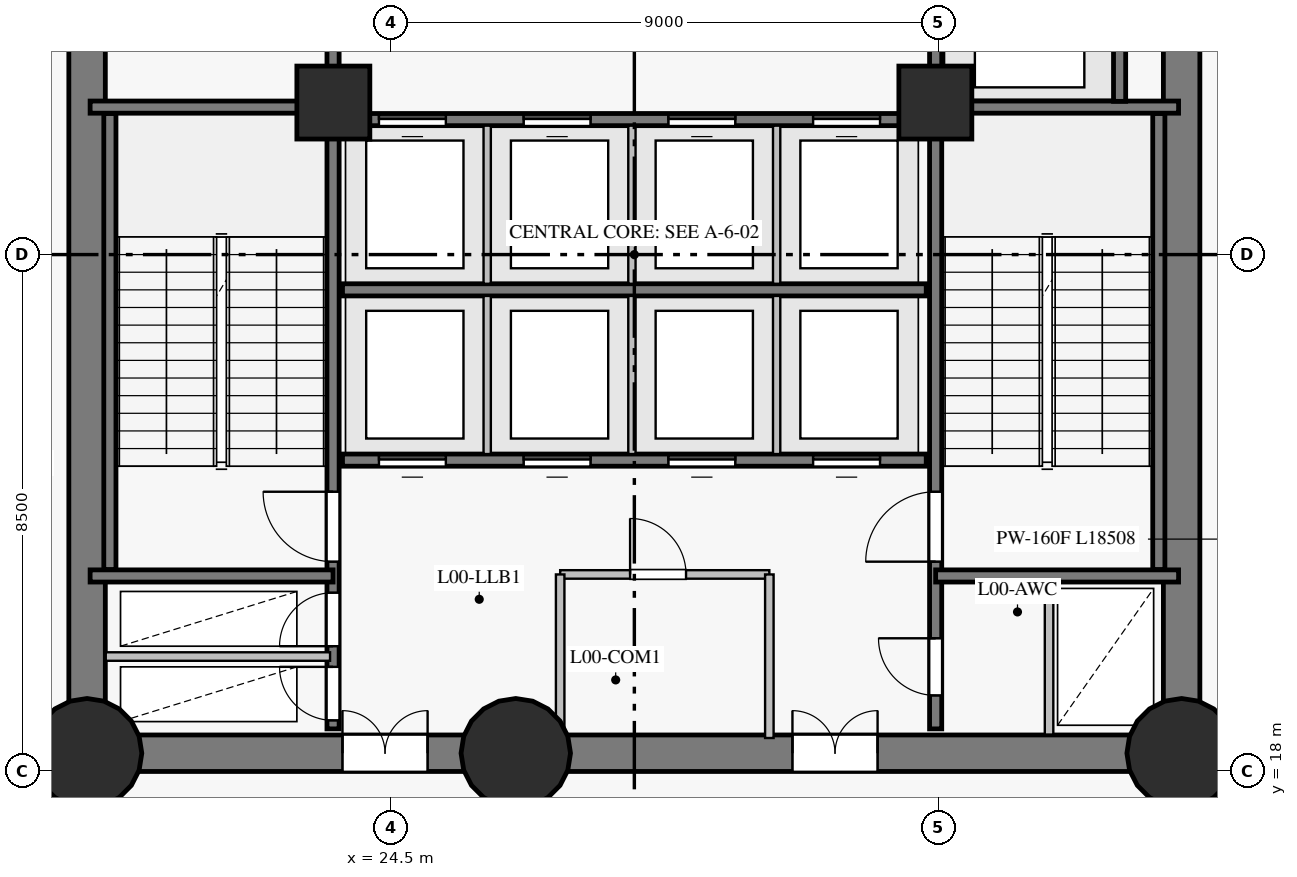
"""IFC4 building model, lengths in metres.
Left out: names, types, materials, properties, quantities, classifications, styles, units other than length and angle.
Written with IfcOpenShell. Run it as: python <this file> out.ifc"""

import sys

from ifc_helpers import new_model, si_unit, direction, frame, frame_2d, origin, origin_with_axes, origin_2d, place, context, subcontext, project, spatial, rectangle, circle, extrude, source, transform, mapped, element, fill, save


model = new_model("IFC4")
c1 = context("Model", 3, precision=1e-05, world=origin(), true_north=direction((0.0, 1.0)))
c2 = subcontext(c1, "Body", "Model", "MODEL_VIEW")
j1 = project(units=[si_unit("LENGTHUNIT", "METRE"), si_unit("PLANEANGLEUNIT", "RADIAN")], contexts=[c1])
p1 = place(None, origin())
s1 = spatial("IfcSite", under=j1, at=p1, CompositionType="ELEMENT")
p2 = place(p1, origin())
s2 = spatial("IfcBuilding", under=s1, at=p2, CompositionType="ELEMENT")
p3 = place(p2, origin())
s3 = spatial("IfcBuildingStorey", under=s2, at=p3, CompositionType="ELEMENT", Elevation=0.0)
p4 = place(p3, frame((19.5, 18.3, 0.0), z_axis=(0.0, 0.0, 1.0), x_axis=(1.0, 0.0, 0.0)))
e1 = element("IfcWall", 1, at=p4, inside=s3, PredefinedType="SHEAR", context=c2, shape_type="SweptSolid", body=[
    extrude(rectangle(XDim=7.05, YDim=0.6, at=frame_2d((3.525, 0.0))), origin(), (0.0, 0.0, 1.0), 4.2),
])
p5 = place(p4, frame((4.2, 0.0, 0.0)))
e2 = element("IfcOpeningElement", 2, at=p5, cuts=e1, PredefinedType="OPENING", context=c2, shape_type="SweptSolid", body=[
    extrude(rectangle(XDim=1.4, YDim=2.2, at=frame_2d((0.7, 1.1))), frame((0.0, 0.31, 0.0), z_axis=(0.0, -1.0, 0.0), x_axis=(1.0, 0.0, 0.0)), (0.0, 0.0, 1.0), 0.62),
])
p6 = place(p3, frame((26.55, 18.3, 0.0), z_axis=(0.0, 0.0, 1.0), x_axis=(1.0, 0.0, 0.0)))
e3 = element("IfcWall", 3, at=p6, inside=s3, PredefinedType="SHEAR", context=c2, shape_type="SweptSolid", body=[
    extrude(rectangle(XDim=10.95, YDim=0.6, at=frame_2d((5.475, 0.0))), origin(), (0.0, 0.0, 1.0), 4.2),
])
p7 = place(p6, frame((4.55, 0.0, 0.0)))
e4 = element("IfcOpeningElement", 4, at=p7, cuts=e3, PredefinedType="OPENING", context=c2, shape_type="SweptSolid", body=[
    extrude(rectangle(XDim=1.4, YDim=2.2, at=frame_2d((0.7, 1.1))), frame((0.0, 0.31, 0.0), z_axis=(0.0, -1.0, 0.0), x_axis=(1.0, 0.0, 0.0)), (0.0, 0.0, 1.0), 0.62),
])
p8 = place(p3, frame((37.5, 18.3, 0.0), z_axis=(0.0, 0.0, 1.0), x_axis=(0.0, 1.0, 0.0)))
e5 = element("IfcWall", 5, at=p8, inside=s3, PredefinedType="SHEAR", context=c2, shape_type="SweptSolid", body=[
    extrude(rectangle(XDim=16.4, YDim=0.6, at=frame_2d((8.2, 0.0))), origin(), (0.0, 0.0, 1.0), 4.2),
])
p9 = place(p8, frame((13.96, 0.0, 0.0)))
e6 = element("IfcOpeningElement", 6, at=p9, cuts=e5, PredefinedType="OPENING", context=c2, shape_type="SweptSolid", body=[
    extrude(rectangle(XDim=1.2, YDim=2.15, at=frame_2d((0.6, 1.075))), frame((0.0, 0.31, 0.0), z_axis=(0.0, -1.0, 0.0), x_axis=(1.0, 0.0, 0.0)), (0.0, 0.0, 1.0), 0.62),
])
p10 = place(p3, frame((19.5, 34.7, 0.0), z_axis=(0.0, 0.0, 1.0), x_axis=(0.0, -1.0, 0.0)))
e7 = element("IfcWall", 7, at=p10, inside=s3, PredefinedType="SHEAR", context=c2, shape_type="SweptSolid", body=[
    extrude(rectangle(XDim=16.4, YDim=0.6, at=frame_2d((8.2, 0.0))), origin(), (0.0, 0.0, 1.0), 4.2),
])
p11 = place(p10, frame((3.1, 0.0, 0.0)))
e8 = element("IfcOpeningElement", 8, at=p11, cuts=e7, PredefinedType="OPENING", context=c2, shape_type="SweptSolid", body=[
    extrude(rectangle(XDim=1.1, YDim=2.15, at=frame_2d((0.55, 1.075))), frame((0.0, 0.31, 0.0), z_axis=(0.0, -1.0, 0.0), x_axis=(1.0, 0.0, 0.0)), (0.0, 0.0, 1.0), 0.62),
])
m1 = source(origin_with_axes(), c2, "Body", "SweptSolid", [
    extrude(circle(Radius=0.9, at=origin_2d()), origin(), (0.0, 0.0, 1.0), 4.5),
])
for number, where, z_axis, x_axis in (
    (9, (19.5, 18.3, 0.0), (0.0, 0.0, 1.0), (1.0, 0.0, 0.0)),
    (10, (26.55, 18.3, 0.0), (0.0, 0.0, 1.0), (1.0, 0.0, 0.0)),
    (11, (37.5, 18.3, 0.0), (0.0, 0.0, 1.0), (1.0, 0.0, 0.0)),
):
    element("IfcColumn", number, at=place(p3, frame(where, z_axis=z_axis, x_axis=x_axis)), inside=s3, PredefinedType="COLUMN", context=c2, shape_type="MappedRepresentation", body=[
        mapped(m1, transform((0.0, 0.0, 0.0), scale=1.0)),
    ])
m2 = source(origin_with_axes(), c2, "Body", "SweptSolid", [
    extrude(rectangle(XDim=1.2, YDim=1.2, at=origin_2d()), origin(), (0.0, 0.0, 1.0), 4.5),
])
for number, where, z_axis, x_axis in (
    (12, (23.55, 29.0, 0.0), (0.0, 0.0, 1.0), (1.0, 0.0, 0.0)),
    (13, (33.45, 29.0, 0.0), (0.0, 0.0, 1.0), (1.0, 0.0, 0.0)),
):
    element("IfcColumn", number, at=place(p3, frame(where, z_axis=z_axis, x_axis=x_axis)), inside=s3, PredefinedType="COLUMN", context=c2, shape_type="MappedRepresentation", body=[
        mapped(m2, transform((0.0, 0.0, 0.0), scale=1.0)),
    ])
p12 = place(p3, frame((23.545, 18.7, 0.0), z_axis=(0.0, 0.0, 1.0), x_axis=(0.0, 1.0, 0.0)))
e14 = element("IfcWall", 14, at=p12, inside=s3, PredefinedType="SHEAR", context=c2, shape_type="SweptSolid", body=[
    extrude(rectangle(XDim=15.6, YDim=0.2, at=frame_2d((7.8, 0.0))), origin(), (0.0, 0.0, 1.0), 4.2),
])
p13 = place(p12, frame((2.75, 0.0, 0.0)))
e15 = element("IfcOpeningElement", 15, at=p13, cuts=e14, PredefinedType="OPENING", context=c2, shape_type="SweptSolid", body=[
    extrude(rectangle(XDim=1.15, YDim=2.15, at=frame_2d((0.575, 1.075))), frame((0.0, 0.11, 0.0), z_axis=(0.0, -1.0, 0.0), x_axis=(1.0, 0.0, 0.0)), (0.0, 0.0, 1.0), 0.22),
])
p14 = place(p12, frame((0.14, 0.0, 0.0)))
e16 = element("IfcOpeningElement", 16, at=p14, cuts=e14, PredefinedType="OPENING", context=c2, shape_type="SweptSolid", body=[
    extrude(rectangle(XDim=0.88, YDim=2.1, at=frame_2d((0.44, 1.05))), frame((0.0, 0.11, 0.0), z_axis=(0.0, -1.0, 0.0), x_axis=(1.0, 0.0, 0.0)), (0.0, 0.0, 1.0), 0.22),
])
p15 = place(p12, frame((1.36, 0.0, 0.0)))
e17 = element("IfcOpeningElement", 17, at=p15, cuts=e14, PredefinedType="OPENING", context=c2, shape_type="SweptSolid", body=[
    extrude(rectangle(XDim=0.88, YDim=2.1, at=frame_2d((0.44, 1.05))), frame((0.0, 0.11, 0.0), z_axis=(0.0, -1.0, 0.0), x_axis=(1.0, 0.0, 0.0)), (0.0, 0.0, 1.0), 0.22),
])
p16 = place(p12, frame((12.1, 0.0, 0.0)))
e18 = element("IfcOpeningElement", 18, at=p16, cuts=e14, PredefinedType="OPENING", context=c2, shape_type="SweptSolid", body=[
    extrude(rectangle(XDim=1.12, YDim=2.15, at=frame_2d((0.56, 1.075))), frame((0.0, 0.11, 0.0), z_axis=(0.0, -1.0, 0.0), x_axis=(1.0, 0.0, 0.0)), (0.0, 0.0, 1.0), 0.22),
])
p17 = place(p12, frame((14.05, 0.0, 0.0)))
e19 = element("IfcOpeningElement", 19, at=p17, cuts=e14, PredefinedType="OPENING", context=c2, shape_type="SweptSolid", body=[
    extrude(rectangle(XDim=1.12, YDim=2.15, at=frame_2d((0.56, 1.075))), frame((0.0, 0.11, 0.0), z_axis=(0.0, -1.0, 0.0), x_axis=(1.0, 0.0, 0.0)), (0.0, 0.0, 1.0), 0.22),
])
p18 = place(p3, frame((33.455, 18.7, 0.0), z_axis=(0.0, 0.0, 1.0), x_axis=(0.0, 1.0, 0.0)))
e20 = element("IfcWall", 20, at=p18, inside=s3, PredefinedType="SHEAR", context=c2, shape_type="SweptSolid", body=[
    extrude(rectangle(XDim=15.6, YDim=0.2, at=frame_2d((7.8, 0.0))), origin(), (0.0, 0.0, 1.0), 4.2),
])
p19 = place(p18, frame((2.75, 0.0, 0.0)))
e21 = element("IfcOpeningElement", 21, at=p19, cuts=e20, PredefinedType="OPENING", context=c2, shape_type="SweptSolid", body=[
    extrude(rectangle(XDim=1.15, YDim=2.15, at=frame_2d((0.575, 1.075))), frame((0.0, 0.11, 0.0), z_axis=(0.0, -1.0, 0.0), x_axis=(1.0, 0.0, 0.0)), (0.0, 0.0, 1.0), 0.22),
])
p20 = place(p18, frame((0.55, 0.0, 0.0)))
e22 = element("IfcOpeningElement", 22, at=p20, cuts=e20, PredefinedType="OPENING", context=c2, shape_type="SweptSolid", body=[
    extrude(rectangle(XDim=0.94, YDim=2.1, at=frame_2d((0.47, 1.05))), frame((0.0, 0.11, 0.0), z_axis=(0.0, -1.0, 0.0), x_axis=(1.0, 0.0, 0.0)), (0.0, 0.0, 1.0), 0.22),
])
p21 = place(p3, frame((23.7, 23.12, 0.0), z_axis=(0.0, 0.0, 1.0), x_axis=(1.0, 0.0, 0.0)))
e23 = element("IfcWall", 23, at=p21, inside=s3, PredefinedType="SHEAR", context=c2, shape_type="SweptSolid", body=[
    extrude(rectangle(XDim=9.6, YDim=0.2, at=frame_2d((4.8, 0.0))), origin(), (0.0, 0.0, 1.0), 4.2),
])
p22 = place(p21, frame((0.6, 0.0, 0.0)))
e24 = element("IfcOpeningElement", 24, at=p22, cuts=e23, PredefinedType="OPENING", context=c2, shape_type="SweptSolid", body=[
    extrude(rectangle(XDim=1.1, YDim=2.15, at=frame_2d((0.55, 1.075))), frame((0.0, 0.11, 0.0), z_axis=(0.0, -1.0, 0.0), x_axis=(1.0, 0.0, 0.0)), (0.0, 0.0, 1.0), 0.22),
])
p23 = place(p21, frame((2.98, 0.0, 0.0)))
e25 = element("IfcOpeningElement", 25, at=p23, cuts=e23, PredefinedType="OPENING", context=c2, shape_type="SweptSolid", body=[
    extrude(rectangle(XDim=1.1, YDim=2.15, at=frame_2d((0.55, 1.075))), frame((0.0, 0.11, 0.0), z_axis=(0.0, -1.0, 0.0), x_axis=(1.0, 0.0, 0.0)), (0.0, 0.0, 1.0), 0.22),
])
p24 = place(p21, frame((5.36, 0.0, 0.0)))
e26 = element("IfcOpeningElement", 26, at=p24, cuts=e23, PredefinedType="OPENING", context=c2, shape_type="SweptSolid", body=[
    extrude(rectangle(XDim=1.1, YDim=2.15, at=frame_2d((0.55, 1.075))), frame((0.0, 0.11, 0.0), z_axis=(0.0, -1.0, 0.0), x_axis=(1.0, 0.0, 0.0)), (0.0, 0.0, 1.0), 0.22),
])
p25 = place(p21, frame((7.74, 0.0, 0.0)))
e27 = element("IfcOpeningElement", 27, at=p25, cuts=e23, PredefinedType="OPENING", context=c2, shape_type="SweptSolid", body=[
    extrude(rectangle(XDim=1.1, YDim=2.15, at=frame_2d((0.55, 1.075))), frame((0.0, 0.11, 0.0), z_axis=(0.0, -1.0, 0.0), x_axis=(1.0, 0.0, 0.0)), (0.0, 0.0, 1.0), 0.22),
])
p26 = place(p3, frame((23.7, 25.92, 0.0), z_axis=(0.0, 0.0, 1.0), x_axis=(1.0, 0.0, 0.0)))
e28 = element("IfcWall", 28, at=p26, inside=s3, PredefinedType="SHEAR", context=c2, shape_type="SweptSolid", body=[
    extrude(rectangle(XDim=9.6, YDim=0.2, at=frame_2d((4.8, 0.0))), origin(), (0.0, 0.0, 1.0), 4.2),
])
p27 = place(p3, frame((23.7, 28.72, 0.0), z_axis=(0.0, 0.0, 1.0), x_axis=(1.0, 0.0, 0.0)))
e29 = element("IfcWall", 29, at=p27, inside=s3, PredefinedType="SHEAR", context=c2, shape_type="SweptSolid", body=[
    extrude(rectangle(XDim=9.6, YDim=0.2, at=frame_2d((4.8, 0.0))), origin(), (0.0, 0.0, 1.0), 4.2),
])
p28 = place(p27, frame((0.6, 0.0, 0.0)))
e30 = element("IfcOpeningElement", 30, at=p28, cuts=e29, PredefinedType="OPENING", context=c2, shape_type="SweptSolid", body=[
    extrude(rectangle(XDim=1.1, YDim=2.15, at=frame_2d((0.55, 1.075))), frame((0.0, 0.11, 0.0), z_axis=(0.0, -1.0, 0.0), x_axis=(1.0, 0.0, 0.0)), (0.0, 0.0, 1.0), 0.22),
])
p29 = place(p27, frame((2.98, 0.0, 0.0)))
e31 = element("IfcOpeningElement", 31, at=p29, cuts=e29, PredefinedType="OPENING", context=c2, shape_type="SweptSolid", body=[
    extrude(rectangle(XDim=1.1, YDim=2.15, at=frame_2d((0.55, 1.075))), frame((0.0, 0.11, 0.0), z_axis=(0.0, -1.0, 0.0), x_axis=(1.0, 0.0, 0.0)), (0.0, 0.0, 1.0), 0.22),
])
p30 = place(p27, frame((5.36, 0.0, 0.0)))
e32 = element("IfcOpeningElement", 32, at=p30, cuts=e29, PredefinedType="OPENING", context=c2, shape_type="SweptSolid", body=[
    extrude(rectangle(XDim=1.1, YDim=2.15, at=frame_2d((0.55, 1.075))), frame((0.0, 0.11, 0.0), z_axis=(0.0, -1.0, 0.0), x_axis=(1.0, 0.0, 0.0)), (0.0, 0.0, 1.0), 0.22),
])
p31 = place(p27, frame((7.74, 0.0, 0.0)))
e33 = element("IfcOpeningElement", 33, at=p31, cuts=e29, PredefinedType="OPENING", context=c2, shape_type="SweptSolid", body=[
    extrude(rectangle(XDim=1.1, YDim=2.15, at=frame_2d((0.55, 1.075))), frame((0.0, 0.11, 0.0), z_axis=(0.0, -1.0, 0.0), x_axis=(1.0, 0.0, 0.0)), (0.0, 0.0, 1.0), 0.22),
])
for number, where, z_axis, x_axis in (
    (34, (19.875, 21.32, 0.0), (0.0, 0.0, 1.0), (0.0, 1.0, 0.0)),
    (35, (37.125, 21.32, 0.0), (0.0, 0.0, 1.0), (0.0, 1.0, 0.0)),
):
    element("IfcWall", number, at=place(p3, frame(where, z_axis=z_axis, x_axis=x_axis)), inside=s3, PredefinedType="SHEAR", context=c2, shape_type="SweptSolid", body=[
        extrude(rectangle(XDim=7.5, YDim=0.2, at=frame_2d((3.75, 0.0))), origin(), (0.0, 0.0, 1.0), 4.2),
    ])
for number, where, z_axis, x_axis in (
    (36, (33.455, 21.215, 0.0), (0.0, 0.0, 1.0), (1.0, 0.0, 0.0)),
    (37, (33.455, 28.925, 0.0), (0.0, 0.0, 1.0), (1.0, 0.0, 0.0)),
    (38, (19.55, 21.215, 0.0), (0.0, 0.0, 1.0), (1.0, 0.0, 0.0)),
    (39, (19.55, 28.925, 0.0), (0.0, 0.0, 1.0), (1.0, 0.0, 0.0)),
):
    element("IfcWall", number, at=place(p3, frame(where, z_axis=z_axis, x_axis=x_axis)), inside=s3, PredefinedType="SHEAR", context=c2, shape_type="SweptSolid", body=[
        extrude(rectangle(XDim=3.995, YDim=0.2, at=frame_2d((1.998, 0.0))), origin(), (0.0, 0.0, 1.0), 4.2),
    ])
p32 = place(p3, frame((36.48, 29.02, 0.0), z_axis=(0.0, 0.0, 1.0), x_axis=(0.0, 1.0, 0.0)))
e40 = element("IfcWall", 40, at=p32, inside=s3, PredefinedType="SHEAR", context=c2, shape_type="SweptSolid", body=[
    extrude(rectangle(XDim=2.86, YDim=0.2, at=frame_2d((1.43, 0.0))), origin(), (0.0, 0.0, 1.0), 4.2),
])
p33 = place(p3, frame((19.807, 19.89, 0.0), z_axis=(0.0, 0.0, 1.0), x_axis=(1.0, 0.0, 0.0)))
e41 = element("IfcWall", 41, at=p33, inside=s3, PredefinedType="PARTITIONING", context=c2, shape_type="SweptSolid", body=[
    extrude(rectangle(XDim=3.689, YDim=0.14, at=frame_2d((1.844, 0.0))), origin(), (0.0, 0.0, 1.0), 4.2),
])
p34 = place(p3, frame((27.28, 21.24, 0.0), z_axis=(0.0, 0.0, 1.0), x_axis=(1.0, 0.0, 0.0)))
e42 = element("IfcWall", 42, at=p34, inside=s3, PredefinedType="PARTITIONING", context=c2, shape_type="SweptSolid", body=[
    extrude(rectangle(XDim=3.44, YDim=0.14, at=frame_2d((1.72, 0.0))), origin(), (0.0, 0.0, 1.0), 4.2),
])
p35 = place(p34, frame((1.15, 0.0, 0.0)))
e43 = element("IfcOpeningElement", 43, at=p35, cuts=e42, PredefinedType="OPENING", context=c2, shape_type="SweptSolid", body=[
    extrude(rectangle(XDim=0.92, YDim=2.1, at=frame_2d((0.46, 1.05))), frame((0.0, 0.08, 0.0), z_axis=(0.0, -1.0, 0.0), x_axis=(1.0, 0.0, 0.0)), (0.0, 0.0, 1.0), 0.16),
])
for number, where, z_axis, x_axis in (
    (44, (27.28, 18.55, 0.0), (0.0, 0.0, 1.0), (0.0, 1.0, 0.0)),
    (45, (30.72, 18.55, 0.0), (0.0, 0.0, 1.0), (0.0, 1.0, 0.0)),
):
    element("IfcWall", number, at=place(p3, frame(where, z_axis=z_axis, x_axis=x_axis)), inside=s3, PredefinedType="PARTITIONING", context=c2, shape_type="SweptSolid", body=[
        extrude(rectangle(XDim=2.69, YDim=0.14, at=frame_2d((1.345, 0.0))), origin(), (0.0, 0.0, 1.0), 4.2),
    ])
for number, where, z_axis, x_axis in (
    (46, (26.08, 23.22, 0.0), (0.0, 0.0, 1.0), (0.0, 1.0, 0.0)),
    (47, (28.46, 23.22, 0.0), (0.0, 0.0, 1.0), (0.0, 1.0, 0.0)),
    (48, (30.84, 23.22, 0.0), (0.0, 0.0, 1.0), (0.0, 1.0, 0.0)),
    (49, (26.08, 26.02, 0.0), (0.0, 0.0, 1.0), (0.0, 1.0, 0.0)),
    (50, (28.46, 26.02, 0.0), (0.0, 0.0, 1.0), (0.0, 1.0, 0.0)),
    (51, (30.84, 26.02, 0.0), (0.0, 0.0, 1.0), (0.0, 1.0, 0.0)),
):
    element("IfcWall", number, at=place(p3, frame(where, z_axis=z_axis, x_axis=x_axis)), inside=s3, PredefinedType="PARTITIONING", context=c2, shape_type="SweptSolid", body=[
        extrude(rectangle(XDim=2.6, YDim=0.12, at=frame_2d((1.3, 0.0))), origin(), (0.0, 0.0, 1.0), 4.2),
    ])
p36 = place(p3, frame((35.32, 18.607, 0.0), z_axis=(0.0, 0.0, 1.0), x_axis=(0.0, 1.0, 0.0)))
e52 = element("IfcWall", 52, at=p36, inside=s3, PredefinedType="PARTITIONING", context=c2, shape_type="SweptSolid", body=[
    extrude(rectangle(XDim=2.503, YDim=0.14, at=frame_2d((1.251, 0.0))), origin(), (0.0, 0.0, 1.0), 4.2),
])
m3 = source(origin_with_axes(), c2, "Body", "SweptSolid", [
    extrude(rectangle(XDim=1.15, YDim=2.15, at=frame_2d((0.575, 1.075))), frame((0.0, 0.025, 0.0), z_axis=(0.0, -1.0, 0.0), x_axis=(1.0, 0.0, 0.0)), (0.0, 0.0, 1.0), 0.05),
])
p37 = place(p13, origin())
e53 = element("IfcDoor", 53, at=p37, inside=s3, OperationType="SINGLE_SWING_RIGHT", PredefinedType="DOOR", context=c2, shape_type="MappedRepresentation", body=[
    mapped(m3, transform((0.0, 0.0, 0.0), scale=1.0)),
])
fill(e15, e53)
p38 = place(p19, origin())
e54 = element("IfcDoor", 54, at=p38, inside=s3, OperationType="SINGLE_SWING_LEFT", PredefinedType="DOOR", context=c2, shape_type="MappedRepresentation", body=[
    mapped(m3, transform((0.0, 0.0, 0.0), scale=1.0)),
])
fill(e21, e54)
m4 = source(origin_with_axes(), c2, "Body", "SweptSolid", [
    extrude(rectangle(XDim=0.88, YDim=2.1, at=frame_2d((0.44, 1.05))), frame((0.0, 0.025, 0.0), z_axis=(0.0, -1.0, 0.0), x_axis=(1.0, 0.0, 0.0)), (0.0, 0.0, 1.0), 0.05),
])
p39 = place(p14, origin())
e55 = element("IfcDoor", 55, at=p39, inside=s3, OperationType="SINGLE_SWING_RIGHT", PredefinedType="DOOR", context=c2, shape_type="MappedRepresentation", body=[
    mapped(m4, transform((0.0, 0.0, 0.0), scale=1.0)),
])
fill(e16, e55)
p40 = place(p15, origin())
e56 = element("IfcDoor", 56, at=p40, inside=s3, OperationType="SINGLE_SWING_LEFT", PredefinedType="DOOR", context=c2, shape_type="MappedRepresentation", body=[
    mapped(m4, transform((0.0, 0.0, 0.0), scale=1.0)),
])
fill(e17, e56)
m5 = source(origin_with_axes(), c2, "Body", "SweptSolid", [
    extrude(rectangle(XDim=1.4, YDim=2.2, at=frame_2d((0.7, 1.1))), frame((0.0, 0.025, 0.0), z_axis=(0.0, -1.0, 0.0), x_axis=(1.0, 0.0, 0.0)), (0.0, 0.0, 1.0), 0.05),
])
p41 = place(p5, origin())
e57 = element("IfcDoor", 57, at=p41, inside=s3, OperationType="DOUBLE_DOOR_SINGLE_SWING", PredefinedType="DOOR", context=c2, shape_type="MappedRepresentation", body=[
    mapped(m5, transform((0.0, 0.0, 0.0), scale=1.0)),
])
fill(e2, e57)
p42 = place(p7, origin())
e58 = element("IfcDoor", 58, at=p42, inside=s3, OperationType="DOUBLE_DOOR_SINGLE_SWING", PredefinedType="DOOR", context=c2, shape_type="MappedRepresentation", body=[
    mapped(m5, transform((0.0, 0.0, 0.0), scale=1.0)),
])
fill(e4, e58)
m6 = source(origin_with_axes(), c2, "Body", "SweptSolid", [
    extrude(rectangle(XDim=0.94, YDim=2.1, at=frame_2d((0.47, 1.05))), frame((0.0, 0.025, 0.0), z_axis=(0.0, -1.0, 0.0), x_axis=(1.0, 0.0, 0.0)), (0.0, 0.0, 1.0), 0.05),
])
p43 = place(p20, origin())
e59 = element("IfcDoor", 59, at=p43, inside=s3, OperationType="SINGLE_SWING_RIGHT", PredefinedType="DOOR", context=c2, shape_type="MappedRepresentation", body=[
    mapped(m6, transform((0.0, 0.0, 0.0), scale=1.0)),
])
fill(e22, e59)
m7 = source(origin_with_axes(), c2, "Body", "SweptSolid", [
    extrude(rectangle(XDim=0.92, YDim=2.1, at=frame_2d((0.46, 1.05))), frame((0.0, 0.025, 0.0), z_axis=(0.0, -1.0, 0.0), x_axis=(1.0, 0.0, 0.0)), (0.0, 0.0, 1.0), 0.05),
])
p44 = place(p35, origin())
e60 = element("IfcDoor", 60, at=p44, inside=s3, OperationType="SINGLE_SWING_LEFT", PredefinedType="DOOR", context=c2, shape_type="MappedRepresentation", body=[
    mapped(m7, transform((0.0, 0.0, 0.0), scale=1.0)),
])
fill(e43, e60)
m8 = source(origin_with_axes(), c2, "Body", "SweptSolid", [
    extrude(rectangle(XDim=1.1, YDim=2.15, at=frame_2d((0.55, 1.075))), frame((0.0, 0.025, 0.0), z_axis=(0.0, -1.0, 0.0), x_axis=(1.0, 0.0, 0.0)), (0.0, 0.0, 1.0), 0.05),
])
p45 = place(p22, origin())
e61 = element("IfcDoor", 61, at=p45, inside=s3, OperationType="SLIDING_TO_LEFT", PredefinedType="DOOR", context=c2, shape_type="MappedRepresentation", body=[
    mapped(m8, transform((0.0, 0.0, 0.0), scale=1.0)),
])
fill(e24, e61)
p46 = place(p23, origin())
e62 = element("IfcDoor", 62, at=p46, inside=s3, OperationType="SLIDING_TO_RIGHT", PredefinedType="DOOR", context=c2, shape_type="MappedRepresentation", body=[
    mapped(m8, transform((0.0, 0.0, 0.0), scale=1.0)),
])
fill(e25, e62)
p47 = place(p24, origin())
e63 = element("IfcDoor", 63, at=p47, inside=s3, OperationType="SLIDING_TO_LEFT", PredefinedType="DOOR", context=c2, shape_type="MappedRepresentation", body=[
    mapped(m8, transform((0.0, 0.0, 0.0), scale=1.0)),
])
fill(e26, e63)
p48 = place(p25, origin())
e64 = element("IfcDoor", 64, at=p48, inside=s3, OperationType="SLIDING_TO_RIGHT", PredefinedType="DOOR", context=c2, shape_type="MappedRepresentation", body=[
    mapped(m8, transform((0.0, 0.0, 0.0), scale=1.0)),
])
fill(e27, e64)
p49 = place(p28, origin())
e65 = element("IfcDoor", 65, at=p49, inside=s3, OperationType="SLIDING_TO_LEFT", PredefinedType="DOOR", context=c2, shape_type="MappedRepresentation", body=[
    mapped(m8, transform((0.0, 0.0, 0.0), scale=1.0)),
])
fill(e30, e65)
p50 = place(p29, origin())
e66 = element("IfcDoor", 66, at=p50, inside=s3, OperationType="SLIDING_TO_RIGHT", PredefinedType="DOOR", context=c2, shape_type="MappedRepresentation", body=[
    mapped(m8, transform((0.0, 0.0, 0.0), scale=1.0)),
])
fill(e31, e66)
p51 = place(p30, origin())
e67 = element("IfcDoor", 67, at=p51, inside=s3, OperationType="SLIDING_TO_LEFT", PredefinedType="DOOR", context=c2, shape_type="MappedRepresentation", body=[
    mapped(m8, transform((0.0, 0.0, 0.0), scale=1.0)),
])
fill(e32, e67)
p52 = place(p31, origin())
e68 = element("IfcDoor", 68, at=p52, inside=s3, OperationType="SLIDING_TO_RIGHT", PredefinedType="DOOR", context=c2, shape_type="MappedRepresentation", body=[
    mapped(m8, transform((0.0, 0.0, 0.0), scale=1.0)),
])
fill(e33, e68)
save(model, sys.argv[1])
